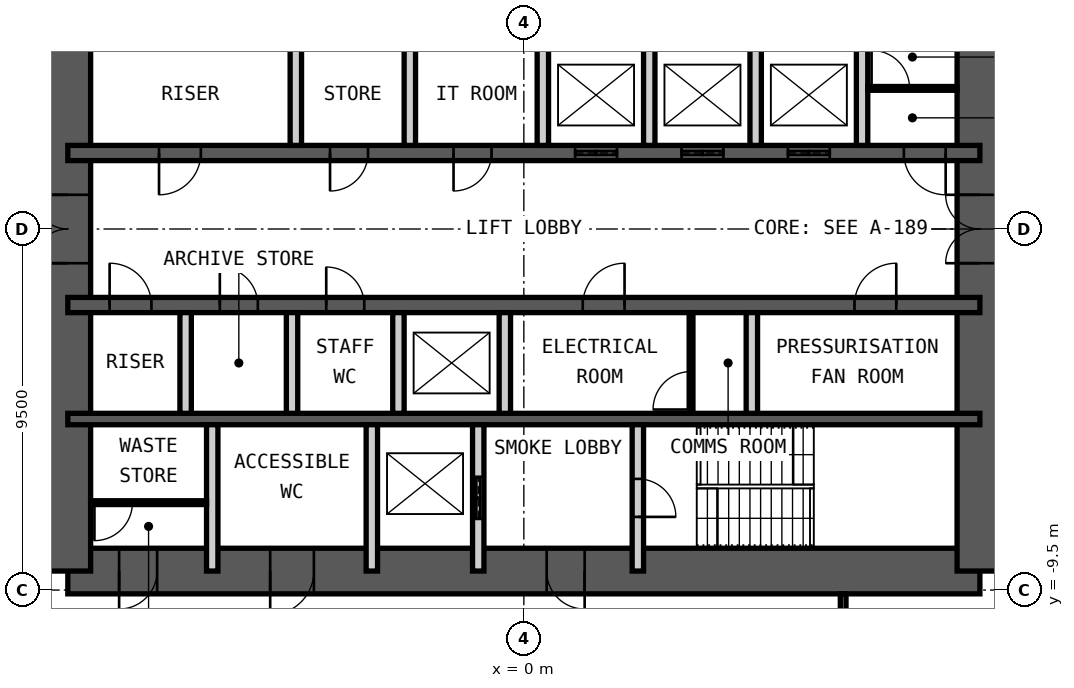
"""IFC4 building model, lengths in metres.
Left out: names, types, materials, properties, quantities, classifications, styles, units other than length and angle.
Written with IfcOpenShell. Run it as: python <this file> out.ifc"""

import sys

from ifc_helpers import new_model, si_unit, direction, frame, frame_2d, origin, place, context, subcontext, project, spatial, rectangle, extrude, element, fill, save


model = new_model("IFC4")
c1 = context("Model", 3, precision=1e-05, world=origin(), true_north=direction((0.0, 1.0)))
c2 = subcontext(c1, "Body", "Model", "MODEL_VIEW")
j1 = project(units=[si_unit("LENGTHUNIT", "METRE"), si_unit("PLANEANGLEUNIT", "RADIAN")], contexts=[c1])
p1 = place(None, origin())
s1 = spatial("IfcSite", under=j1, at=p1, CompositionType="ELEMENT")
p2 = place(p1, origin())
s2 = spatial("IfcBuilding", under=s1, at=p2, CompositionType="ELEMENT")
p3 = place(p2, frame((0.0, 0.0, 197.2)))
s3 = spatial("IfcBuildingStorey", under=s2, at=p3, CompositionType="ELEMENT", Elevation=197.2)
p4 = place(p3, frame((-12.0, -9.0, 0.0), z_axis=(0.0, 0.0, 1.0), x_axis=(1.0, 0.0, 0.0)))
e1 = element("IfcWall", 1, at=p4, inside=s3, PredefinedType="SHEAR", context=c2, shape_type="SweptSolid", body=[
    extrude(rectangle(XDim=24.0, YDim=1.2, at=frame_2d((12.0, 0.0))), origin(), (0.0, 0.0, 1.0), 4.2),
])
p5 = place(p4, frame((1.35, 0.0, 0.0)))
e2 = element("IfcOpeningElement", 2, at=p5, cuts=e1, PredefinedType="OPENING", context=c2, shape_type="SweptSolid", body=[
    extrude(rectangle(XDim=1.0, YDim=2.1, at=frame_2d((0.5, 1.05))), frame((0.0, 0.61, 0.0), z_axis=(0.0, -1.0, 0.0), x_axis=(1.0, 0.0, 0.0)), (0.0, 0.0, 1.0), 1.22),
])
p6 = place(p4, frame((5.325, 0.0, 0.0)))
e3 = element("IfcOpeningElement", 3, at=p6, cuts=e1, PredefinedType="OPENING", context=c2, shape_type="SweptSolid", body=[
    extrude(rectangle(XDim=1.15, YDim=2.1, at=frame_2d((0.575, 1.05))), frame((0.0, 0.61, 0.0), z_axis=(0.0, -1.0, 0.0), x_axis=(1.0, 0.0, 0.0)), (0.0, 0.0, 1.0), 1.22),
])
p7 = place(p4, frame((12.6, 0.0, 0.0)))
e4 = element("IfcOpeningElement", 4, at=p7, cuts=e1, PredefinedType="OPENING", context=c2, shape_type="SweptSolid", body=[
    extrude(rectangle(XDim=1.0, YDim=2.1, at=frame_2d((0.5, 1.05))), frame((0.0, 0.61, 0.0), z_axis=(0.0, -1.0, 0.0), x_axis=(1.0, 0.0, 0.0)), (0.0, 0.0, 1.0), 1.22),
])
p8 = place(p3, frame((12.0, -9.0, 0.0), z_axis=(0.0, 0.0, 1.0), x_axis=(0.0, 1.0, 0.0)))
e5 = element("IfcWall", 5, at=p8, inside=s3, PredefinedType="SHEAR", context=c2, shape_type="SweptSolid", body=[
    extrude(rectangle(XDim=18.0, YDim=1.2, at=frame_2d((9.0, 0.0))), origin(), (0.0, 0.0, 1.0), 4.2),
])
p9 = place(p8, frame((8.1, 0.0, 0.0)))
e6 = element("IfcOpeningElement", 6, at=p9, cuts=e5, PredefinedType="OPENING", context=c2, shape_type="SweptSolid", body=[
    extrude(rectangle(XDim=1.8, YDim=2.1, at=frame_2d((0.9, 1.05))), frame((0.0, 0.61, 0.0), z_axis=(0.0, -1.0, 0.0), x_axis=(1.0, 0.0, 0.0)), (0.0, 0.0, 1.0), 1.22),
])
p10 = place(p3, frame((-12.0, -9.0, 0.0), z_axis=(0.0, 0.0, 1.0), x_axis=(0.0, 1.0, 0.0)))
e7 = element("IfcWall", 7, at=p10, inside=s3, PredefinedType="SHEAR", context=c2, shape_type="SweptSolid", body=[
    extrude(rectangle(XDim=18.0, YDim=1.2, at=frame_2d((9.0, 0.0))), origin(), (0.0, 0.0, 1.0), 4.2),
])
p11 = place(p10, frame((8.1, 0.0, 0.0)))
e8 = element("IfcOpeningElement", 8, at=p11, cuts=e7, PredefinedType="OPENING", context=c2, shape_type="SweptSolid", body=[
    extrude(rectangle(XDim=1.8, YDim=2.1, at=frame_2d((0.9, 1.05))), frame((0.0, 0.61, 0.0), z_axis=(0.0, -1.0, 0.0), x_axis=(1.0, 0.0, 0.0)), (0.0, 0.0, 1.0), 1.22),
])
p12 = place(p3, frame((-12.0, 2.0, 0.0), z_axis=(0.0, 0.0, 1.0), x_axis=(1.0, 0.0, 0.0)))
e9 = element("IfcWall", 9, at=p12, inside=s3, PredefinedType="SHEAR", context=c2, shape_type="SweptSolid", body=[
    extrude(rectangle(XDim=24.0, YDim=0.4, at=frame_2d((12.0, 0.0))), origin(), (0.0, 0.0, 1.0), 4.2),
])
p13 = place(p12, frame((2.4, 0.0, 0.0)))
e10 = element("IfcOpeningElement", 10, at=p13, cuts=e9, PredefinedType="OPENING", context=c2, shape_type="SweptSolid", body=[
    extrude(rectangle(XDim=1.1, YDim=2.1, at=frame_2d((0.55, 1.05))), frame((0.0, 0.21, 0.0), z_axis=(0.0, -1.0, 0.0), x_axis=(1.0, 0.0, 0.0)), (0.0, 0.0, 1.0), 0.42),
])
p14 = place(p12, frame((22.0, 0.0, 0.0)))
e11 = element("IfcOpeningElement", 11, at=p14, cuts=e9, PredefinedType="OPENING", context=c2, shape_type="SweptSolid", body=[
    extrude(rectangle(XDim=1.1, YDim=2.1, at=frame_2d((0.55, 1.05))), frame((0.0, 0.21, 0.0), z_axis=(0.0, -1.0, 0.0), x_axis=(1.0, 0.0, 0.0)), (0.0, 0.0, 1.0), 0.42),
])
p15 = place(p12, frame((10.15, 0.0, 0.0)))
e12 = element("IfcOpeningElement", 12, at=p15, cuts=e9, PredefinedType="OPENING", context=c2, shape_type="SweptSolid", body=[
    extrude(rectangle(XDim=1.0, YDim=2.1, at=frame_2d((0.5, 1.05))), frame((0.0, 0.21, 0.0), z_axis=(0.0, -1.0, 0.0), x_axis=(1.0, 0.0, 0.0)), (0.0, 0.0, 1.0), 0.42),
])
p16 = place(p12, frame((6.9, 0.0, 0.0)))
e13 = element("IfcOpeningElement", 13, at=p16, cuts=e9, PredefinedType="OPENING", context=c2, shape_type="SweptSolid", body=[
    extrude(rectangle(XDim=1.0, YDim=2.1, at=frame_2d((0.5, 1.05))), frame((0.0, 0.21, 0.0), z_axis=(0.0, -1.0, 0.0), x_axis=(1.0, 0.0, 0.0)), (0.0, 0.0, 1.0), 0.42),
])
p17 = place(p12, frame((13.35, 0.0, 0.0)))
e14 = element("IfcOpeningElement", 14, at=p17, cuts=e9, PredefinedType="OPENING", context=c2, shape_type="SweptSolid", body=[
    extrude(rectangle(XDim=1.1, YDim=2.4, at=frame_2d((0.55, 1.2))), frame((0.0, 0.21, 0.0), z_axis=(0.0, -1.0, 0.0), x_axis=(1.0, 0.0, 0.0)), (0.0, 0.0, 1.0), 0.42),
])
p18 = place(p12, frame((16.15, 0.0, 0.0)))
e15 = element("IfcOpeningElement", 15, at=p18, cuts=e9, PredefinedType="OPENING", context=c2, shape_type="SweptSolid", body=[
    extrude(rectangle(XDim=1.1, YDim=2.4, at=frame_2d((0.55, 1.2))), frame((0.0, 0.21, 0.0), z_axis=(0.0, -1.0, 0.0), x_axis=(1.0, 0.0, 0.0)), (0.0, 0.0, 1.0), 0.42),
])
p19 = place(p12, frame((18.95, 0.0, 0.0)))
e16 = element("IfcOpeningElement", 16, at=p19, cuts=e9, PredefinedType="OPENING", context=c2, shape_type="SweptSolid", body=[
    extrude(rectangle(XDim=1.1, YDim=2.4, at=frame_2d((0.55, 1.2))), frame((0.0, 0.21, 0.0), z_axis=(0.0, -1.0, 0.0), x_axis=(1.0, 0.0, 0.0)), (0.0, 0.0, 1.0), 0.42),
])
p20 = place(p3, frame((-12.0, -2.0, 0.0), z_axis=(0.0, 0.0, 1.0), x_axis=(1.0, 0.0, 0.0)))
e17 = element("IfcWall", 17, at=p20, inside=s3, PredefinedType="SHEAR", context=c2, shape_type="SweptSolid", body=[
    extrude(rectangle(XDim=24.0, YDim=0.4, at=frame_2d((12.0, 0.0))), origin(), (0.0, 0.0, 1.0), 4.2),
])
p21 = place(p20, frame((1.1, 0.0, 0.0)))
e18 = element("IfcOpeningElement", 18, at=p21, cuts=e17, PredefinedType="OPENING", context=c2, shape_type="SweptSolid", body=[
    extrude(rectangle(XDim=1.1, YDim=2.1, at=frame_2d((0.55, 1.05))), frame((0.0, 0.21, 0.0), z_axis=(0.0, -1.0, 0.0), x_axis=(1.0, 0.0, 0.0)), (0.0, 0.0, 1.0), 0.42),
])
p22 = place(p20, frame((13.55, 0.0, 0.0)))
e19 = element("IfcOpeningElement", 19, at=p22, cuts=e17, PredefinedType="OPENING", context=c2, shape_type="SweptSolid", body=[
    extrude(rectangle(XDim=1.1, YDim=2.1, at=frame_2d((0.55, 1.05))), frame((0.0, 0.21, 0.0), z_axis=(0.0, -1.0, 0.0), x_axis=(1.0, 0.0, 0.0)), (0.0, 0.0, 1.0), 0.42),
])
p23 = place(p20, frame((20.7, 0.0, 0.0)))
e20 = element("IfcOpeningElement", 20, at=p23, cuts=e17, PredefinedType="OPENING", context=c2, shape_type="SweptSolid", body=[
    extrude(rectangle(XDim=1.1, YDim=2.1, at=frame_2d((0.55, 1.05))), frame((0.0, 0.21, 0.0), z_axis=(0.0, -1.0, 0.0), x_axis=(1.0, 0.0, 0.0)), (0.0, 0.0, 1.0), 0.42),
])
p24 = place(p20, frame((4.0, 0.0, 0.0)))
e21 = element("IfcOpeningElement", 21, at=p24, cuts=e17, PredefinedType="OPENING", context=c2, shape_type="SweptSolid", body=[
    extrude(rectangle(XDim=1.0, YDim=2.1, at=frame_2d((0.5, 1.05))), frame((0.0, 0.21, 0.0), z_axis=(0.0, -1.0, 0.0), x_axis=(1.0, 0.0, 0.0)), (0.0, 0.0, 1.0), 0.42),
])
p25 = place(p20, frame((6.8, 0.0, 0.0)))
e22 = element("IfcOpeningElement", 22, at=p25, cuts=e17, PredefinedType="OPENING", context=c2, shape_type="SweptSolid", body=[
    extrude(rectangle(XDim=1.0, YDim=2.1, at=frame_2d((0.5, 1.05))), frame((0.0, 0.21, 0.0), z_axis=(0.0, -1.0, 0.0), x_axis=(1.0, 0.0, 0.0)), (0.0, 0.0, 1.0), 0.42),
])
p26 = place(p3, frame((-12.0, -5.0, 0.0), z_axis=(0.0, 0.0, 1.0), x_axis=(1.0, 0.0, 0.0)))
e23 = element("IfcWall", 23, at=p26, inside=s3, PredefinedType="SHEAR", context=c2, shape_type="SweptSolid", body=[
    extrude(rectangle(XDim=24.0, YDim=0.3, at=frame_2d((12.0, 0.0))), origin(), (0.0, 0.0, 1.0), 4.2),
])
for number, where, z_axis, x_axis in (
    (24, (-6.0, 2.2, 0.0), (0.0, 0.0, 1.0), (0.0, 1.0, 0.0)),
    (25, (-3.0, 2.2, 0.0), (0.0, 0.0, 1.0), (0.0, 1.0, 0.0)),
    (26, (0.5, 2.2, 0.0), (0.0, 0.0, 1.0), (0.0, 1.0, 0.0)),
    (27, (3.3, 2.2, 0.0), (0.0, 0.0, 1.0), (0.0, 1.0, 0.0)),
    (28, (6.1, 2.2, 0.0), (0.0, 0.0, 1.0), (0.0, 1.0, 0.0)),
    (29, (8.9, 2.2, 0.0), (0.0, 0.0, 1.0), (0.0, 1.0, 0.0)),
    (30, (-8.9, -4.85, 0.0), (0.0, 0.0, 1.0), (0.0, 1.0, 0.0)),
    (31, (-6.1, -4.85, 0.0), (0.0, 0.0, 1.0), (0.0, 1.0, 0.0)),
    (32, (-3.3, -4.85, 0.0), (0.0, 0.0, 1.0), (0.0, 1.0, 0.0)),
    (33, (-0.5, -4.85, 0.0), (0.0, 0.0, 1.0), (0.0, 1.0, 0.0)),
    (34, (6.0, -4.85, 0.0), (0.0, 0.0, 1.0), (0.0, 1.0, 0.0)),
):
    element("IfcWall", number, at=place(p3, frame(where, z_axis=z_axis, x_axis=x_axis)), inside=s3, PredefinedType="PARTITIONING", context=c2, shape_type="SweptSolid", body=[
        extrude(rectangle(XDim=2.65, YDim=0.3, at=frame_2d((1.325, 0.0))), origin(), (0.0, 0.0, 1.0), 3.98),
    ])
for number, where, z_axis, x_axis in (
    (35, (-8.2, -9.0, 0.0), (0.0, 0.0, 1.0), (0.0, 1.0, 0.0)),
    (36, (-4.0, -9.0, 0.0), (0.0, 0.0, 1.0), (0.0, 1.0, 0.0)),
):
    element("IfcWall", number, at=place(p3, frame(where, z_axis=z_axis, x_axis=x_axis)), inside=s3, PredefinedType="PARTITIONING", context=c2, shape_type="SweptSolid", body=[
        extrude(rectangle(XDim=3.85, YDim=0.3, at=frame_2d((1.925, 0.0))), origin(), (0.0, 0.0, 1.0), 3.98),
    ])
p27 = place(p3, frame((-1.2, -9.0, 0.0), z_axis=(0.0, 0.0, 1.0), x_axis=(0.0, 1.0, 0.0)))
e37 = element("IfcWall", 37, at=p27, inside=s3, PredefinedType="PARTITIONING", context=c2, shape_type="SweptSolid", body=[
    extrude(rectangle(XDim=3.85, YDim=0.3, at=frame_2d((1.925, 0.0))), origin(), (0.0, 0.0, 1.0), 3.98),
])
p28 = place(p27, frame((1.375, 0.0, 0.0)))
e38 = element("IfcOpeningElement", 38, at=p28, cuts=e37, PredefinedType="OPENING", context=c2, shape_type="SweptSolid", body=[
    extrude(rectangle(XDim=1.1, YDim=2.4, at=frame_2d((0.55, 1.2))), frame((0.0, 0.16, 0.0), z_axis=(0.0, -1.0, 0.0), x_axis=(1.0, 0.0, 0.0)), (0.0, 0.0, 1.0), 0.32),
])
p29 = place(p3, frame((3.0, -9.0, 0.0), z_axis=(0.0, 0.0, 1.0), x_axis=(0.0, 1.0, 0.0)))
e39 = element("IfcWall", 39, at=p29, inside=s3, PredefinedType="PARTITIONING", context=c2, shape_type="SweptSolid", body=[
    extrude(rectangle(XDim=3.85, YDim=0.3, at=frame_2d((1.925, 0.0))), origin(), (0.0, 0.0, 1.0), 3.98),
])
p30 = place(p29, frame((1.425, 0.0, 0.0)))
e40 = element("IfcOpeningElement", 40, at=p30, cuts=e39, PredefinedType="OPENING", context=c2, shape_type="SweptSolid", body=[
    extrude(rectangle(XDim=1.0, YDim=2.1, at=frame_2d((0.5, 1.05))), frame((0.0, 0.16, 0.0), z_axis=(0.0, -1.0, 0.0), x_axis=(1.0, 0.0, 0.0)), (0.0, 0.0, 1.0), 0.32),
])
p31 = place(p3, frame((4.4, -4.85, 0.0), z_axis=(0.0, 0.0, 1.0), x_axis=(0.0, 1.0, 0.0)))
e41 = element("IfcWall", 41, at=p31, inside=s3, PredefinedType="PARTITIONING", context=c2, shape_type="SweptSolid", body=[
    extrude(rectangle(XDim=2.65, YDim=0.1, at=frame_2d((1.325, 0.0))), origin(), (0.0, 0.0, 1.0), 3.98),
])
p32 = place(p31, frame((0.1, 0.0, 0.0)))
e42 = element("IfcOpeningElement", 42, at=p32, cuts=e41, PredefinedType="OPENING", context=c2, shape_type="SweptSolid", body=[
    extrude(rectangle(XDim=1.0, YDim=2.4, at=frame_2d((0.5, 1.2))), frame((0.0, 0.06, 0.0), z_axis=(0.0, -1.0, 0.0), x_axis=(1.0, 0.0, 0.0)), (0.0, 0.0, 1.0), 0.12),
])
p33 = place(p3, frame((-11.4, -7.2, 0.0), z_axis=(0.0, 0.0, 1.0), x_axis=(1.0, 0.0, 0.0)))
e43 = element("IfcWall", 43, at=p33, inside=s3, PredefinedType="PARTITIONING", context=c2, shape_type="SweptSolid", body=[
    extrude(rectangle(XDim=3.05, YDim=0.1, at=frame_2d((1.525, 0.0))), origin(), (0.0, 0.0, 1.0), 3.98),
])
p34 = place(p33, frame((0.1, 0.0, 0.0)))
e44 = element("IfcOpeningElement", 44, at=p34, cuts=e43, PredefinedType="OPENING", context=c2, shape_type="SweptSolid", body=[
    extrude(rectangle(XDim=1.0, YDim=2.4, at=frame_2d((0.5, 1.2))), frame((0.0, 0.06, 0.0), z_axis=(0.0, -1.0, 0.0), x_axis=(1.0, 0.0, 0.0)), (0.0, 0.0, 1.0), 0.12),
])
p35 = place(p3, frame((9.05, 3.7, 0.0), z_axis=(0.0, 0.0, 1.0), x_axis=(1.0, 0.0, 0.0)))
e45 = element("IfcWall", 45, at=p35, inside=s3, PredefinedType="PARTITIONING", context=c2, shape_type="SweptSolid", body=[
    extrude(rectangle(XDim=2.35, YDim=0.1, at=frame_2d((1.175, 0.0))), origin(), (0.0, 0.0, 1.0), 3.98),
])
p36 = place(p35, frame((0.1, 0.0, 0.0)))
e46 = element("IfcOpeningElement", 46, at=p36, cuts=e45, PredefinedType="OPENING", context=c2, shape_type="SweptSolid", body=[
    extrude(rectangle(XDim=1.0, YDim=2.4, at=frame_2d((0.5, 1.2))), frame((0.0, 0.06, 0.0), z_axis=(0.0, -1.0, 0.0), x_axis=(1.0, 0.0, 0.0)), (0.0, 0.0, 1.0), 0.12),
])
p37 = place(p3, frame((8.403, -9.6, 0.0), z_axis=(0.0, 0.0, 1.0), x_axis=(0.0, -1.0, 0.0)))
e47 = element("IfcWall", 47, at=p37, inside=s3, PredefinedType="PARTITIONING", context=c2, shape_type="SweptSolid", body=[
    extrude(rectangle(XDim=1.875, YDim=0.15, at=frame_2d((0.938, 0.0))), origin(), (0.0, 0.0, 1.0), 4.03),
])
p38 = place(p5, origin())
e48 = element("IfcDoor", 48, at=p38, inside=s3, OperationType="SINGLE_SWING_LEFT", PredefinedType="DOOR", context=c2, shape_type="SweptSolid", body=[
    extrude(rectangle(XDim=1.0, YDim=2.1, at=frame_2d((0.5, 1.05))), frame((0.0, 0.025, 0.0), z_axis=(0.0, -1.0, 0.0), x_axis=(1.0, 0.0, 0.0)), (0.0, 0.0, 1.0), 0.05),
])
fill(e2, e48)
p39 = place(p6, origin())
e49 = element("IfcDoor", 49, at=p39, inside=s3, OperationType="SINGLE_SWING_LEFT", PredefinedType="DOOR", context=c2, shape_type="SweptSolid", body=[
    extrude(rectangle(XDim=1.15, YDim=2.1, at=frame_2d((0.575, 1.05))), frame((0.0, 0.025, 0.0), z_axis=(0.0, -1.0, 0.0), x_axis=(1.0, 0.0, 0.0)), (0.0, 0.0, 1.0), 0.05),
])
fill(e3, e49)
p40 = place(p7, origin())
e50 = element("IfcDoor", 50, at=p40, inside=s3, OperationType="SINGLE_SWING_RIGHT", PredefinedType="DOOR", context=c2, shape_type="SweptSolid", body=[
    extrude(rectangle(XDim=1.0, YDim=2.1, at=frame_2d((0.5, 1.05))), frame((0.0, 0.025, 0.0), z_axis=(0.0, -1.0, 0.0), x_axis=(1.0, 0.0, 0.0)), (0.0, 0.0, 1.0), 0.05),
])
fill(e4, e50)
p41 = place(p30, origin())
e51 = element("IfcDoor", 51, at=p41, inside=s3, OperationType="SINGLE_SWING_LEFT", PredefinedType="DOOR", context=c2, shape_type="SweptSolid", body=[
    extrude(rectangle(XDim=1.0, YDim=2.1, at=frame_2d((0.5, 1.05))), frame((0.0, 0.025, 0.0), z_axis=(0.0, -1.0, 0.0), x_axis=(1.0, 0.0, 0.0)), (0.0, 0.0, 1.0), 0.05),
])
fill(e40, e51)
p42 = place(p13, origin())
e52 = element("IfcDoor", 52, at=p42, inside=s3, OperationType="SINGLE_SWING_LEFT", PredefinedType="DOOR", context=c2, shape_type="SweptSolid", body=[
    extrude(rectangle(XDim=1.1, YDim=2.1, at=frame_2d((0.55, 1.05))), frame((0.0, 0.025, 0.0), z_axis=(0.0, -1.0, 0.0), x_axis=(1.0, 0.0, 0.0)), (0.0, 0.0, 1.0), 0.05),
])
fill(e10, e52)
p43 = place(p21, origin())
e53 = element("IfcDoor", 53, at=p43, inside=s3, OperationType="SINGLE_SWING_RIGHT", PredefinedType="DOOR", context=c2, shape_type="SweptSolid", body=[
    extrude(rectangle(XDim=1.1, YDim=2.1, at=frame_2d((0.55, 1.05))), frame((0.0, 0.025, 0.0), z_axis=(0.0, -1.0, 0.0), x_axis=(1.0, 0.0, 0.0)), (0.0, 0.0, 1.0), 0.05),
])
fill(e18, e53)
p44 = place(p14, origin())
e54 = element("IfcDoor", 54, at=p44, inside=s3, OperationType="SINGLE_SWING_RIGHT", PredefinedType="DOOR", context=c2, shape_type="SweptSolid", body=[
    extrude(rectangle(XDim=1.1, YDim=2.1, at=frame_2d((0.55, 1.05))), frame((0.0, 0.025, 0.0), z_axis=(0.0, -1.0, 0.0), x_axis=(1.0, 0.0, 0.0)), (0.0, 0.0, 1.0), 0.05),
])
fill(e11, e54)
p45 = place(p15, origin())
e55 = element("IfcDoor", 55, at=p45, inside=s3, OperationType="SINGLE_SWING_LEFT", PredefinedType="DOOR", context=c2, shape_type="SweptSolid", body=[
    extrude(rectangle(XDim=1.0, YDim=2.1, at=frame_2d((0.5, 1.05))), frame((0.0, 0.025, 0.0), z_axis=(0.0, -1.0, 0.0), x_axis=(1.0, 0.0, 0.0)), (0.0, 0.0, 1.0), 0.05),
])
fill(e12, e55)
p46 = place(p22, origin())
e56 = element("IfcDoor", 56, at=p46, inside=s3, OperationType="SINGLE_SWING_LEFT", PredefinedType="DOOR", context=c2, shape_type="SweptSolid", body=[
    extrude(rectangle(XDim=1.1, YDim=2.1, at=frame_2d((0.55, 1.05))), frame((0.0, 0.025, 0.0), z_axis=(0.0, -1.0, 0.0), x_axis=(1.0, 0.0, 0.0)), (0.0, 0.0, 1.0), 0.05),
])
fill(e19, e56)
p47 = place(p23, origin())
e57 = element("IfcDoor", 57, at=p47, inside=s3, OperationType="SINGLE_SWING_LEFT", PredefinedType="DOOR", context=c2, shape_type="SweptSolid", body=[
    extrude(rectangle(XDim=1.1, YDim=2.1, at=frame_2d((0.55, 1.05))), frame((0.0, 0.025, 0.0), z_axis=(0.0, -1.0, 0.0), x_axis=(1.0, 0.0, 0.0)), (0.0, 0.0, 1.0), 0.05),
])
fill(e20, e57)
p48 = place(p9, origin())
e58 = element("IfcDoor", 58, at=p48, inside=s3, OperationType="DOUBLE_DOOR_DOUBLE_SWING", PredefinedType="DOOR", context=c2, shape_type="SweptSolid", body=[
    extrude(rectangle(XDim=1.8, YDim=2.1, at=frame_2d((0.9, 1.05))), frame((0.0, 0.025, 0.0), z_axis=(0.0, -1.0, 0.0), x_axis=(1.0, 0.0, 0.0)), (0.0, 0.0, 1.0), 0.05),
])
fill(e6, e58)
p49 = place(p11, origin())
e59 = element("IfcDoor", 59, at=p49, inside=s3, OperationType="DOUBLE_DOOR_DOUBLE_SWING", PredefinedType="DOOR", context=c2, shape_type="SweptSolid", body=[
    extrude(rectangle(XDim=1.8, YDim=2.1, at=frame_2d((0.9, 1.05))), frame((0.0, 0.025, 0.0), z_axis=(0.0, -1.0, 0.0), x_axis=(1.0, 0.0, 0.0)), (0.0, 0.0, 1.0), 0.05),
])
fill(e8, e59)
p50 = place(p28, origin())
e60 = element("IfcDoor", 60, at=p50, inside=s3, OperationType="DOUBLE_DOOR_SLIDING", PredefinedType="DOOR", context=c2, shape_type="SweptSolid", body=[
    extrude(rectangle(XDim=1.1, YDim=2.4, at=frame_2d((0.55, 1.2))), frame((0.0, 0.025, 0.0), z_axis=(0.0, -1.0, 0.0), x_axis=(1.0, 0.0, 0.0)), (0.0, 0.0, 1.0), 0.05),
])
fill(e38, e60)
p51 = place(p16, origin())
e61 = element("IfcDoor", 61, at=p51, inside=s3, OperationType="SINGLE_SWING_LEFT", PredefinedType="DOOR", context=c2, shape_type="SweptSolid", body=[
    extrude(rectangle(XDim=1.0, YDim=2.1, at=frame_2d((0.5, 1.05))), frame((0.0, 0.025, 0.0), z_axis=(0.0, -1.0, 0.0), x_axis=(1.0, 0.0, 0.0)), (0.0, 0.0, 1.0), 0.05),
])
fill(e13, e61)
p52 = place(p17, origin())
e62 = element("IfcDoor", 62, at=p52, inside=s3, OperationType="DOUBLE_DOOR_SLIDING", PredefinedType="DOOR", context=c2, shape_type="SweptSolid", body=[
    extrude(rectangle(XDim=1.1, YDim=2.4, at=frame_2d((0.55, 1.2))), frame((0.0, 0.025, 0.0), z_axis=(0.0, -1.0, 0.0), x_axis=(1.0, 0.0, 0.0)), (0.0, 0.0, 1.0), 0.05),
])
fill(e14, e62)
p53 = place(p18, origin())
e63 = element("IfcDoor", 63, at=p53, inside=s3, OperationType="DOUBLE_DOOR_SLIDING", PredefinedType="DOOR", context=c2, shape_type="SweptSolid", body=[
    extrude(rectangle(XDim=1.1, YDim=2.4, at=frame_2d((0.55, 1.2))), frame((0.0, 0.025, 0.0), z_axis=(0.0, -1.0, 0.0), x_axis=(1.0, 0.0, 0.0)), (0.0, 0.0, 1.0), 0.05),
])
fill(e15, e63)
p54 = place(p19, origin())
e64 = element("IfcDoor", 64, at=p54, inside=s3, OperationType="DOUBLE_DOOR_SLIDING", PredefinedType="DOOR", context=c2, shape_type="SweptSolid", body=[
    extrude(rectangle(XDim=1.1, YDim=2.4, at=frame_2d((0.55, 1.2))), frame((0.0, 0.025, 0.0), z_axis=(0.0, -1.0, 0.0), x_axis=(1.0, 0.0, 0.0)), (0.0, 0.0, 1.0), 0.05),
])
fill(e16, e64)
p55 = place(p24, origin())
e65 = element("IfcDoor", 65, at=p55, inside=s3, OperationType="SINGLE_SWING_RIGHT", PredefinedType="DOOR", context=c2, shape_type="SweptSolid", body=[
    extrude(rectangle(XDim=1.0, YDim=2.1, at=frame_2d((0.5, 1.05))), frame((0.0, 0.025, 0.0), z_axis=(0.0, -1.0, 0.0), x_axis=(1.0, 0.0, 0.0)), (0.0, 0.0, 1.0), 0.05),
])
fill(e21, e65)
p56 = place(p25, origin())
e66 = element("IfcDoor", 66, at=p56, inside=s3, OperationType="SINGLE_SWING_RIGHT", PredefinedType="DOOR", context=c2, shape_type="SweptSolid", body=[
    extrude(rectangle(XDim=1.0, YDim=2.1, at=frame_2d((0.5, 1.05))), frame((0.0, 0.025, 0.0), z_axis=(0.0, -1.0, 0.0), x_axis=(1.0, 0.0, 0.0)), (0.0, 0.0, 1.0), 0.05),
])
fill(e22, e66)
p57 = place(p32, origin())
e67 = element("IfcDoor", 67, at=p57, inside=s3, OperationType="SINGLE_SWING_RIGHT", PredefinedType="DOOR", context=c2, shape_type="SweptSolid", body=[
    extrude(rectangle(XDim=1.0, YDim=2.4, at=frame_2d((0.5, 1.2))), frame((0.0, 0.025, 0.0), z_axis=(0.0, -1.0, 0.0), x_axis=(1.0, 0.0, 0.0)), (0.0, 0.0, 1.0), 0.05),
])
fill(e42, e67)
p58 = place(p34, origin())
e68 = element("IfcDoor", 68, at=p58, inside=s3, OperationType="SINGLE_SWING_LEFT", PredefinedType="DOOR", context=c2, shape_type="SweptSolid", body=[
    extrude(rectangle(XDim=1.0, YDim=2.4, at=frame_2d((0.5, 1.2))), frame((0.0, 0.025, 0.0), z_axis=(0.0, -1.0, 0.0), x_axis=(1.0, 0.0, 0.0)), (0.0, 0.0, 1.0), 0.05),
])
fill(e44, e68)
p59 = place(p36, origin())
e69 = element("IfcDoor", 69, at=p59, inside=s3, OperationType="SINGLE_SWING_RIGHT", PredefinedType="DOOR", context=c2, shape_type="SweptSolid", body=[
    extrude(rectangle(XDim=1.0, YDim=2.4, at=frame_2d((0.5, 1.2))), frame((0.0, 0.025, 0.0), z_axis=(0.0, -1.0, 0.0), x_axis=(1.0, 0.0, 0.0)), (0.0, 0.0, 1.0), 0.05),
])
fill(e46, e69)
save(model, sys.argv[1])
